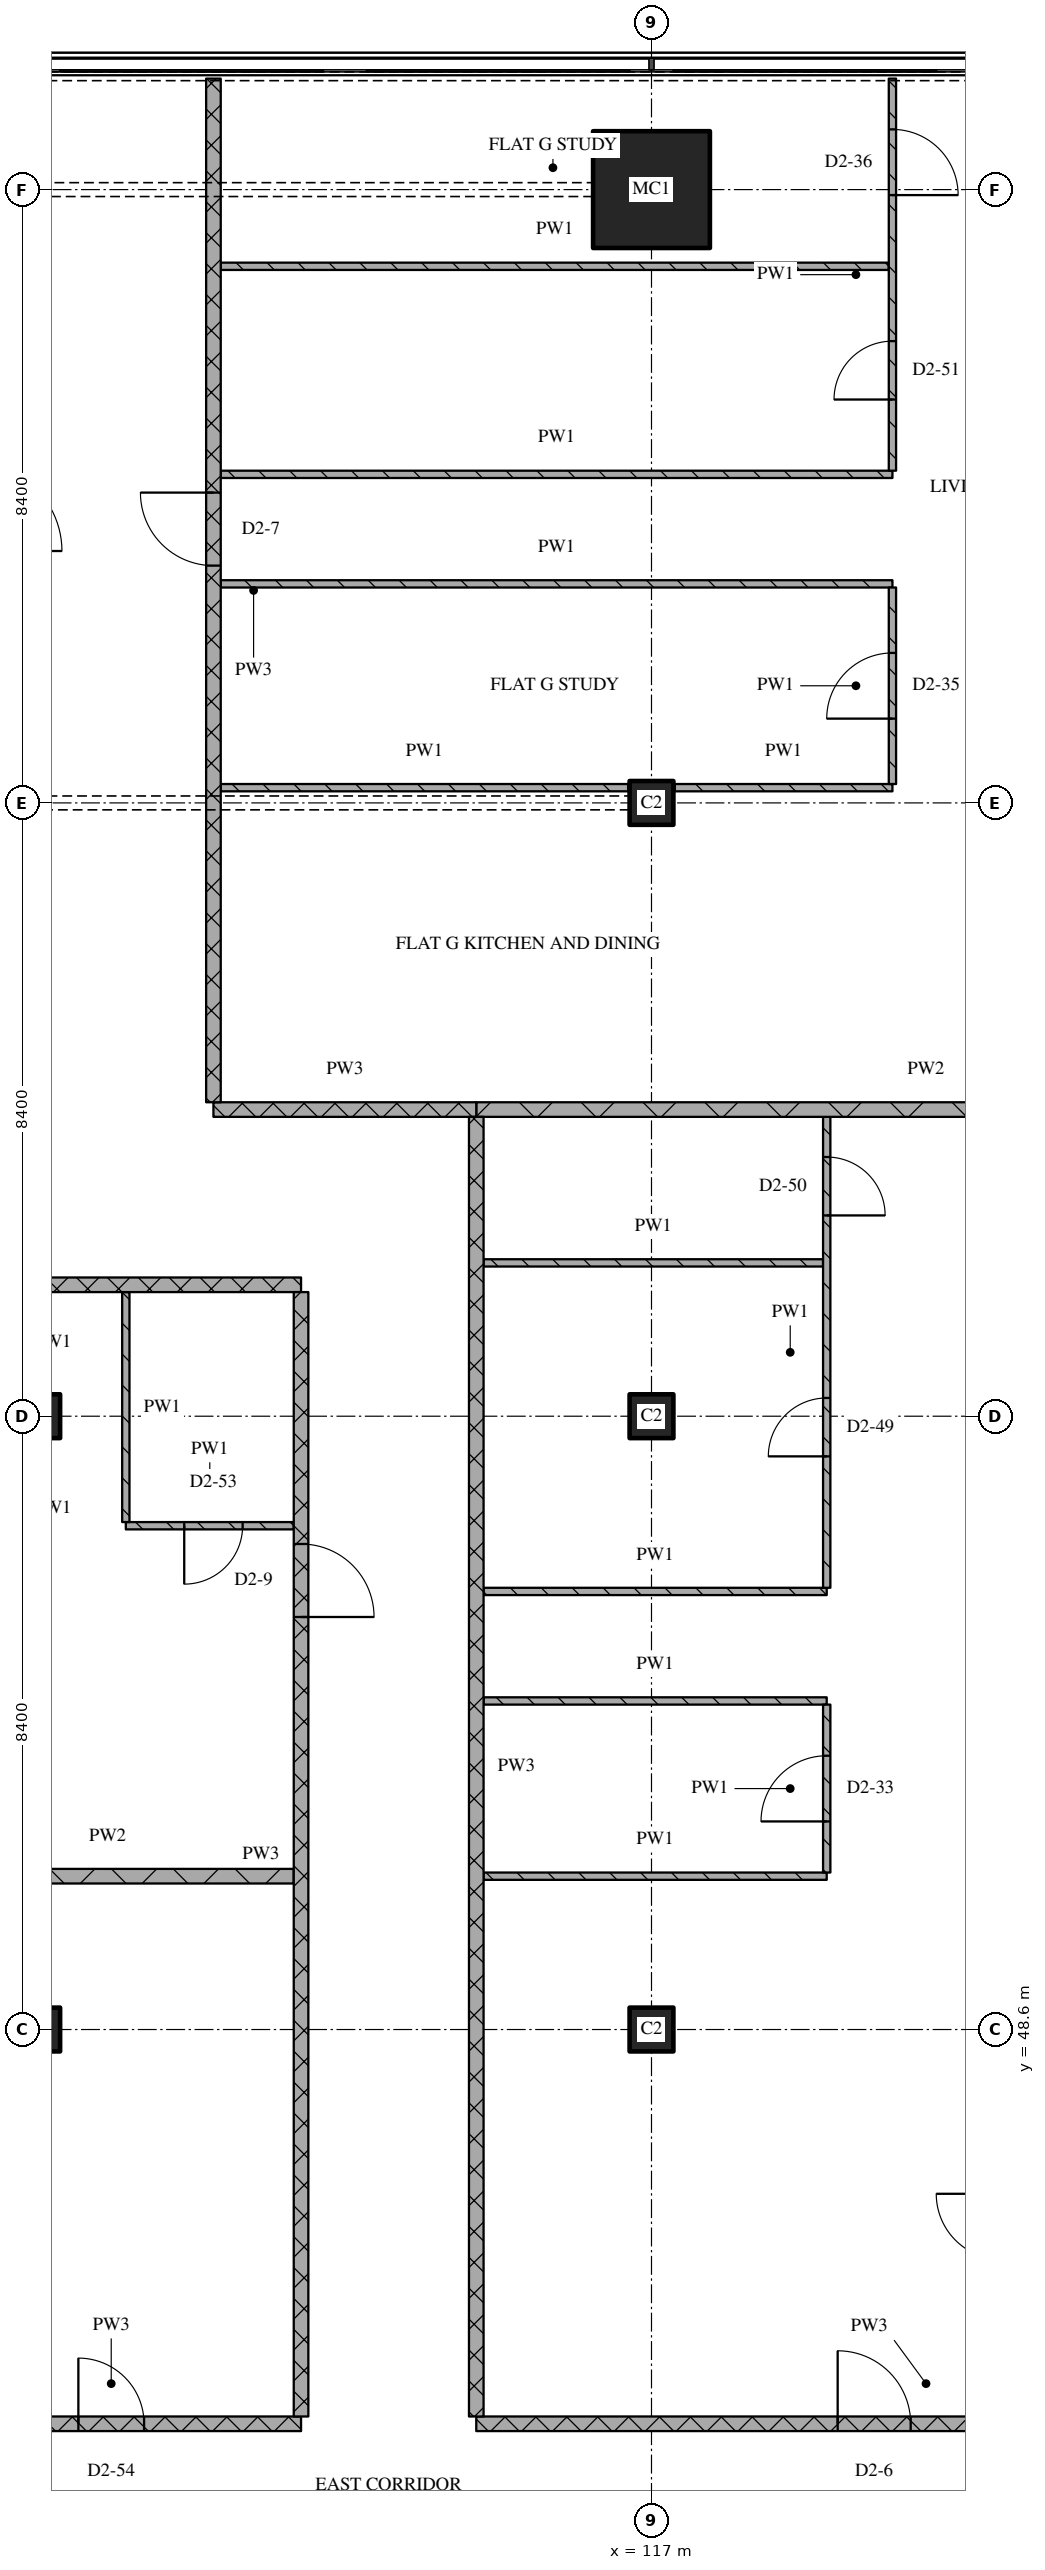
"""IFC4 building model, lengths in metres.
Left out: names, types, materials, properties, quantities, classifications, styles, units other than length and angle.
Written with IfcOpenShell. Run it as: python <this file> out.ifc"""

import sys

from ifc_helpers import new_model, si_unit, direction, frame, frame_2d, origin, origin_2d, place, context, subcontext, project, spatial, rectangle, extrude, element, fill, save


model = new_model("IFC4")
c1 = context("Model", 3, precision=1e-05, world=origin(), true_north=direction((0.0, 1.0)))
c2 = subcontext(c1, "Body", "Model", "MODEL_VIEW")
j1 = project(units=[si_unit("LENGTHUNIT", "METRE"), si_unit("PLANEANGLEUNIT", "RADIAN")], contexts=[c1])
p1 = place(None, origin())
s1 = spatial("IfcSite", under=j1, at=p1, CompositionType="ELEMENT")
p2 = place(p1, origin())
s2 = spatial("IfcBuilding", under=s1, at=p2, CompositionType="ELEMENT")
p3 = place(p2, frame((0.0, 0.0, 223.5)))
s3 = spatial("IfcBuildingStorey", under=s2, at=p3, CompositionType="ELEMENT", Elevation=223.5)
for number, where, z_axis, x_axis in (
    (1, (108.6, 48.6, 0.0), (0.0, 0.0, 1.0), (1.0, 0.0, 0.0)),
    (2, (108.6, 57.0, 0.0), (0.0, 0.0, 1.0), (1.0, 0.0, 0.0)),
    (3, (117.0, 48.6, 0.0), (0.0, 0.0, 1.0), (1.0, 0.0, 0.0)),
    (4, (117.0, 57.0, 0.0), (0.0, 0.0, 1.0), (1.0, 0.0, 0.0)),
    (5, (117.0, 65.4, 0.0), (0.0, 0.0, 1.0), (1.0, 0.0, 0.0)),
):
    element("IfcColumn", number, at=place(p3, frame(where, z_axis=z_axis, x_axis=x_axis)), inside=s3, PredefinedType="COLUMN", context=c2, shape_type="SweptSolid", body=[
        extrude(rectangle(XDim=0.6, YDim=0.6, at=origin_2d()), origin(), (0.0, 0.0, 1.0), 3.6),
    ])
p4 = place(p3, frame((117.0, 73.8, 0.0), z_axis=(0.0, 0.0, 1.0), x_axis=(1.0, 0.0, 0.0)))
e6 = element("IfcColumn", 6, at=p4, inside=s3, PredefinedType="COLUMN", context=c2, shape_type="SweptSolid", body=[
    extrude(rectangle(XDim=1.6, YDim=1.6, at=origin_2d()), origin(), (0.0, 0.0, 1.0), 3.6),
])
p5 = place(p3, frame((107.0, 43.2, 0.0), z_axis=(0.0, 0.0, 1.0), x_axis=(1.0, 0.0, 0.0)))
e7 = element("IfcWall", 7, at=p5, inside=s3, PredefinedType="PARTITIONING", context=c2, shape_type="SweptSolid", body=[
    extrude(rectangle(XDim=5.2, YDim=0.2, at=frame_2d((2.6, 0.0))), origin(), (0.0, 0.0, 1.0), 3.32),
])
p6 = place(p5, frame((2.15, 0.0, 0.0)))
e8 = element("IfcOpeningElement", 8, at=p6, cuts=e7, PredefinedType="OPENING", context=c2, shape_type="SweptSolid", body=[
    extrude(rectangle(XDim=0.9, YDim=2.1, at=frame_2d((0.45, 1.05))), frame((0.0, 0.11, 0.0), z_axis=(0.0, -1.0, 0.0), x_axis=(1.0, 0.0, 0.0)), (0.0, 0.0, 1.0), 0.22),
])
p7 = place(p3, frame((114.6, 43.2, 0.0), z_axis=(0.0, 0.0, 1.0), x_axis=(1.0, 0.0, 0.0)))
e9 = element("IfcWall", 9, at=p7, inside=s3, PredefinedType="PARTITIONING", context=c2, shape_type="SweptSolid", body=[
    extrude(rectangle(XDim=12.32, YDim=0.2, at=frame_2d((6.16, 0.0))), origin(), (0.0, 0.0, 1.0), 3.32),
])
p8 = place(p7, frame((4.95, 0.0, 0.0)))
e10 = element("IfcOpeningElement", 10, at=p8, cuts=e9, PredefinedType="OPENING", context=c2, shape_type="SweptSolid", body=[
    extrude(rectangle(XDim=1.0, YDim=2.1, at=frame_2d((0.5, 1.05))), frame((0.0, 0.11, 0.0), z_axis=(0.0, -1.0, 0.0), x_axis=(1.0, 0.0, 0.0)), (0.0, 0.0, 1.0), 0.22),
])
p9 = place(p3, frame((107.0, 50.7, 0.0), z_axis=(0.0, 0.0, 1.0), x_axis=(1.0, 0.0, 0.0)))
e11 = element("IfcWall", 11, at=p9, inside=s3, PredefinedType="PARTITIONING", context=c2, shape_type="SweptSolid", body=[
    extrude(rectangle(XDim=5.1, YDim=0.2, at=frame_2d((2.55, 0.0))), origin(), (0.0, 0.0, 1.0), 3.32),
])
for number, where, z_axis, x_axis in (
    (12, (114.7, 50.7, 0.0), (0.0, 0.0, 1.0), (1.0, 0.0, 0.0)),
    (13, (114.7, 53.1, 0.0), (0.0, 0.0, 1.0), (1.0, 0.0, 0.0)),
    (14, (114.7, 54.6, 0.0), (0.0, 0.0, 1.0), (1.0, 0.0, 0.0)),
):
    element("IfcWall", number, at=place(p3, frame(where, z_axis=z_axis, x_axis=x_axis)), inside=s3, PredefinedType="PARTITIONING", context=c2, shape_type="SweptSolid", body=[
        extrude(rectangle(XDim=4.7, YDim=0.1, at=frame_2d((2.35, 0.0))), origin(), (0.0, 0.0, 1.0), 3.32),
    ])
p10 = place(p3, frame((109.8, 55.5, 0.0), z_axis=(0.0, 0.0, 1.0), x_axis=(1.0, 0.0, 0.0)))
e15 = element("IfcWall", 15, at=p10, inside=s3, PredefinedType="PARTITIONING", context=c2, shape_type="SweptSolid", body=[
    extrude(rectangle(XDim=2.3, YDim=0.1, at=frame_2d((1.15, 0.0))), origin(), (0.0, 0.0, 1.0), 3.32),
])
p11 = place(p10, frame((0.8, 0.0, 0.0)))
e16 = element("IfcOpeningElement", 16, at=p11, cuts=e15, PredefinedType="OPENING", context=c2, shape_type="SweptSolid", body=[
    extrude(rectangle(XDim=0.8, YDim=2.1, at=frame_2d((0.4, 1.05))), frame((0.0, 0.06, 0.0), z_axis=(0.0, -1.0, 0.0), x_axis=(1.0, 0.0, 0.0)), (0.0, 0.0, 1.0), 0.12),
])
p12 = place(p3, frame((101.4, 58.8, 0.0), z_axis=(0.0, 0.0, 1.0), x_axis=(1.0, 0.0, 0.0)))
e17 = element("IfcWall", 17, at=p12, inside=s3, PredefinedType="PARTITIONING", context=c2, shape_type="SweptSolid", body=[
    extrude(rectangle(XDim=10.8, YDim=0.2, at=frame_2d((5.4, 0.0))), origin(), (0.0, 0.0, 1.0), 3.32),
])
p13 = place(p3, frame((114.7, 59.1, 0.0), z_axis=(0.0, 0.0, 1.0), x_axis=(1.0, 0.0, 0.0)))
e18 = element("IfcWall", 18, at=p13, inside=s3, PredefinedType="PARTITIONING", context=c2, shape_type="SweptSolid", body=[
    extrude(rectangle(XDim=4.65, YDim=0.1, at=frame_2d((2.325, 0.0))), origin(), (0.0, 0.0, 1.0), 3.32),
])
p14 = place(p3, frame((111.0, 61.2, 0.0), z_axis=(0.0, 0.0, 1.0), x_axis=(1.0, 0.0, 0.0)))
e19 = element("IfcWall", 19, at=p14, inside=s3, PredefinedType="PARTITIONING", context=c2, shape_type="SweptSolid", body=[
    extrude(rectangle(XDim=3.6, YDim=0.2, at=frame_2d((1.8, 0.0))), origin(), (0.0, 0.0, 1.0), 3.32),
])
p15 = place(p3, frame((114.6, 61.2, 0.0), z_axis=(0.0, 0.0, 1.0), x_axis=(1.0, 0.0, 0.0)))
e20 = element("IfcWall", 20, at=p15, inside=s3, PredefinedType="PARTITIONING", context=c2, shape_type="SweptSolid", body=[
    extrude(rectangle(XDim=12.32, YDim=0.2, at=frame_2d((6.16, 0.0))), origin(), (0.0, 0.0, 1.0), 3.32),
])
p16 = place(p3, frame((111.1, 65.609, 0.0), z_axis=(0.0, 0.0, 1.0), x_axis=(1.0, 0.0, 0.0)))
e21 = element("IfcWall", 21, at=p16, inside=s3, PredefinedType="PARTITIONING", context=c2, shape_type="SweptSolid", body=[
    extrude(rectangle(XDim=5.58, YDim=0.1, at=frame_2d((2.79, 0.0))), origin(), (0.0, 0.0, 1.0), 3.32),
])
p17 = place(p3, frame((117.32, 65.609, 0.0), z_axis=(0.0, 0.0, 1.0), x_axis=(1.0, 0.0, 0.0)))
e22 = element("IfcWall", 22, at=p17, inside=s3, PredefinedType="PARTITIONING", context=c2, shape_type="SweptSolid", body=[
    extrude(rectangle(XDim=2.98, YDim=0.1, at=frame_2d((1.49, 0.0))), origin(), (0.0, 0.0, 1.0), 3.32),
])
for number, where, z_axis, x_axis in (
    (23, (111.1, 68.4, 0.0), (0.0, 0.0, 1.0), (1.0, 0.0, 0.0)),
    (24, (111.1, 69.9, 0.0), (0.0, 0.0, 1.0), (1.0, 0.0, 0.0)),
):
    element("IfcWall", number, at=place(p3, frame(where, z_axis=z_axis, x_axis=x_axis)), inside=s3, PredefinedType="PARTITIONING", context=c2, shape_type="SweptSolid", body=[
        extrude(rectangle(XDim=9.2, YDim=0.1, at=frame_2d((4.6, 0.0))), origin(), (0.0, 0.0, 1.0), 3.32),
    ])
p18 = place(p3, frame((111.1, 72.75, 0.0), z_axis=(0.0, 0.0, 1.0), x_axis=(1.0, 0.0, 0.0)))
e25 = element("IfcWall", 25, at=p18, inside=s3, PredefinedType="PARTITIONING", context=c2, shape_type="SweptSolid", body=[
    extrude(rectangle(XDim=9.15, YDim=0.1, at=frame_2d((4.575, 0.0))), origin(), (0.0, 0.0, 1.0), 3.32),
])
p19 = place(p3, frame((109.8, 58.7, 0.0), z_axis=(0.0, 0.0, 1.0), x_axis=(0.0, -1.0, 0.0)))
e26 = element("IfcWall", 26, at=p19, inside=s3, PredefinedType="PARTITIONING", context=c2, shape_type="SweptSolid", body=[
    extrude(rectangle(XDim=3.15, YDim=0.1, at=frame_2d((1.575, 0.0))), origin(), (0.0, 0.0, 1.0), 3.32),
])
p20 = place(p3, frame((111.0, 75.32, 0.0), z_axis=(0.0, 0.0, 1.0), x_axis=(0.0, -1.0, 0.0)))
e27 = element("IfcWall", 27, at=p20, inside=s3, PredefinedType="PARTITIONING", context=c2, shape_type="SweptSolid", body=[
    extrude(rectangle(XDim=14.02, YDim=0.2, at=frame_2d((7.01, 0.0))), origin(), (0.0, 0.0, 1.0), 3.32),
])
p21 = place(p20, frame((5.67, 0.0, 0.0)))
e28 = element("IfcOpeningElement", 28, at=p21, cuts=e27, PredefinedType="OPENING", context=c2, shape_type="SweptSolid", body=[
    extrude(rectangle(XDim=1.0, YDim=2.1, at=frame_2d((0.5, 1.05))), frame((0.0, 0.11, 0.0), z_axis=(0.0, -1.0, 0.0), x_axis=(1.0, 0.0, 0.0)), (0.0, 0.0, 1.0), 0.22),
])
p22 = place(p3, frame((112.2, 43.3, 0.0), z_axis=(0.0, 0.0, 1.0), x_axis=(0.0, 1.0, 0.0)))
e29 = element("IfcWall", 29, at=p22, inside=s3, PredefinedType="PARTITIONING", context=c2, shape_type="SweptSolid", body=[
    extrude(rectangle(XDim=15.4, YDim=0.2, at=frame_2d((7.7, 0.0))), origin(), (0.0, 0.0, 1.0), 3.32),
])
p23 = place(p22, frame((10.95, 0.0, 0.0)))
e30 = element("IfcOpeningElement", 30, at=p23, cuts=e29, PredefinedType="OPENING", context=c2, shape_type="SweptSolid", body=[
    extrude(rectangle(XDim=1.0, YDim=2.1, at=frame_2d((0.5, 1.05))), frame((0.0, 0.11, 0.0), z_axis=(0.0, -1.0, 0.0), x_axis=(1.0, 0.0, 0.0)), (0.0, 0.0, 1.0), 0.22),
])
p24 = place(p3, frame((114.6, 61.1, 0.0), z_axis=(0.0, 0.0, 1.0), x_axis=(0.0, -1.0, 0.0)))
e31 = element("IfcWall", 31, at=p24, inside=s3, PredefinedType="PARTITIONING", context=c2, shape_type="SweptSolid", body=[
    extrude(rectangle(XDim=17.8, YDim=0.2, at=frame_2d((8.9, 0.0))), origin(), (0.0, 0.0, 1.0), 3.32),
])
p25 = place(p3, frame((119.4, 50.75, 0.0), z_axis=(0.0, 0.0, 1.0), x_axis=(0.0, 1.0, 0.0)))
e32 = element("IfcWall", 32, at=p25, inside=s3, PredefinedType="PARTITIONING", context=c2, shape_type="SweptSolid", body=[
    extrude(rectangle(XDim=2.3, YDim=0.1, at=frame_2d((1.15, 0.0))), origin(), (0.0, 0.0, 1.0), 3.32),
])
p26 = place(p25, frame((0.7, 0.0, 0.0)))
e33 = element("IfcOpeningElement", 33, at=p26, cuts=e32, PredefinedType="OPENING", context=c2, shape_type="SweptSolid", body=[
    extrude(rectangle(XDim=0.9, YDim=2.1, at=frame_2d((0.45, 1.05))), frame((0.0, 0.06, 0.0), z_axis=(0.0, -1.0, 0.0), x_axis=(1.0, 0.0, 0.0)), (0.0, 0.0, 1.0), 0.12),
])
p27 = place(p3, frame((119.4, 54.65, 0.0), z_axis=(0.0, 0.0, 1.0), x_axis=(0.0, 1.0, 0.0)))
e34 = element("IfcWall", 34, at=p27, inside=s3, PredefinedType="PARTITIONING", context=c2, shape_type="SweptSolid", body=[
    extrude(rectangle(XDim=6.45, YDim=0.1, at=frame_2d((3.225, 0.0))), origin(), (0.0, 0.0, 1.0), 3.32),
])
p28 = place(p27, frame((1.8, 0.0, 0.0)))
e35 = element("IfcOpeningElement", 35, at=p28, cuts=e34, PredefinedType="OPENING", context=c2, shape_type="SweptSolid", body=[
    extrude(rectangle(XDim=0.8, YDim=2.1, at=frame_2d((0.4, 1.05))), frame((0.0, 0.06, 0.0), z_axis=(0.0, -1.0, 0.0), x_axis=(1.0, 0.0, 0.0)), (0.0, 0.0, 1.0), 0.12),
])
p29 = place(p27, frame((5.1, 0.0, 0.0)))
e36 = element("IfcOpeningElement", 36, at=p29, cuts=e34, PredefinedType="OPENING", context=c2, shape_type="SweptSolid", body=[
    extrude(rectangle(XDim=0.8, YDim=2.1, at=frame_2d((0.4, 1.05))), frame((0.0, 0.06, 0.0), z_axis=(0.0, -1.0, 0.0), x_axis=(1.0, 0.0, 0.0)), (0.0, 0.0, 1.0), 0.12),
])
p30 = place(p3, frame((120.3, 65.659, 0.0), z_axis=(0.0, 0.0, 1.0), x_axis=(0.0, 1.0, 0.0)))
e37 = element("IfcWall", 37, at=p30, inside=s3, PredefinedType="PARTITIONING", context=c2, shape_type="SweptSolid", body=[
    extrude(rectangle(XDim=2.691, YDim=0.1, at=frame_2d((1.346, 0.0))), origin(), (0.0, 0.0, 1.0), 3.32),
])
p31 = place(p30, frame((0.896, 0.0, 0.0)))
e38 = element("IfcOpeningElement", 38, at=p31, cuts=e37, PredefinedType="OPENING", context=c2, shape_type="SweptSolid", body=[
    extrude(rectangle(XDim=0.9, YDim=2.1, at=frame_2d((0.45, 1.05))), frame((0.0, 0.06, 0.0), z_axis=(0.0, -1.0, 0.0), x_axis=(1.0, 0.0, 0.0)), (0.0, 0.0, 1.0), 0.12),
])
p32 = place(p3, frame((120.3, 69.95, 0.0), z_axis=(0.0, 0.0, 1.0), x_axis=(0.0, 1.0, 0.0)))
e39 = element("IfcWall", 39, at=p32, inside=s3, PredefinedType="PARTITIONING", context=c2, shape_type="SweptSolid", body=[
    extrude(rectangle(XDim=5.37, YDim=0.1, at=frame_2d((2.685, 0.0))), origin(), (0.0, 0.0, 1.0), 3.32),
])
p33 = place(p32, frame((0.975, 0.0, 0.0)))
e40 = element("IfcOpeningElement", 40, at=p33, cuts=e39, PredefinedType="OPENING", context=c2, shape_type="SweptSolid", body=[
    extrude(rectangle(XDim=0.8, YDim=2.1, at=frame_2d((0.4, 1.05))), frame((0.0, 0.06, 0.0), z_axis=(0.0, -1.0, 0.0), x_axis=(1.0, 0.0, 0.0)), (0.0, 0.0, 1.0), 0.12),
])
p34 = place(p32, frame((3.775, 0.0, 0.0)))
e41 = element("IfcOpeningElement", 41, at=p34, cuts=e39, PredefinedType="OPENING", context=c2, shape_type="SweptSolid", body=[
    extrude(rectangle(XDim=0.9, YDim=2.1, at=frame_2d((0.45, 1.05))), frame((0.0, 0.06, 0.0), z_axis=(0.0, -1.0, 0.0), x_axis=(1.0, 0.0, 0.0)), (0.0, 0.0, 1.0), 0.12),
])
p35 = place(p6, origin())
e42 = element("IfcDoor", 42, at=p35, inside=s3, OperationType="SINGLE_SWING_LEFT", PredefinedType="DOOR", context=c2, shape_type="SweptSolid", body=[
    extrude(rectangle(XDim=0.9, YDim=2.1, at=frame_2d((0.45, 1.05))), frame((0.0, 0.025, 0.0), z_axis=(0.0, -1.0, 0.0), x_axis=(1.0, 0.0, 0.0)), (0.0, 0.0, 1.0), 0.05),
])
fill(e8, e42)
p36 = place(p8, origin())
e43 = element("IfcDoor", 43, at=p36, inside=s3, OperationType="SINGLE_SWING_LEFT", PredefinedType="DOOR", context=c2, shape_type="SweptSolid", body=[
    extrude(rectangle(XDim=1.0, YDim=2.1, at=frame_2d((0.5, 1.05))), frame((0.0, 0.025, 0.0), z_axis=(0.0, -1.0, 0.0), x_axis=(1.0, 0.0, 0.0)), (0.0, 0.0, 1.0), 0.05),
])
fill(e10, e43)
p37 = place(p11, origin())
e44 = element("IfcDoor", 44, at=p37, inside=s3, OperationType="SINGLE_SWING_RIGHT", PredefinedType="DOOR", context=c2, shape_type="SweptSolid", body=[
    extrude(rectangle(XDim=0.8, YDim=2.1, at=frame_2d((0.4, 1.05))), frame((0.0, 0.025, 0.0), z_axis=(0.0, -1.0, 0.0), x_axis=(1.0, 0.0, 0.0)), (0.0, 0.0, 1.0), 0.05),
])
fill(e16, e44)
p38 = place(p21, origin())
e45 = element("IfcDoor", 45, at=p38, inside=s3, OperationType="SINGLE_SWING_RIGHT", PredefinedType="DOOR", context=c2, shape_type="SweptSolid", body=[
    extrude(rectangle(XDim=1.0, YDim=2.1, at=frame_2d((0.5, 1.05))), frame((0.0, 0.025, 0.0), z_axis=(0.0, -1.0, 0.0), x_axis=(1.0, 0.0, 0.0)), (0.0, 0.0, 1.0), 0.05),
])
fill(e28, e45)
p39 = place(p23, origin())
e46 = element("IfcDoor", 46, at=p39, inside=s3, OperationType="SINGLE_SWING_RIGHT", PredefinedType="DOOR", context=c2, shape_type="SweptSolid", body=[
    extrude(rectangle(XDim=1.0, YDim=2.1, at=frame_2d((0.5, 1.05))), frame((0.0, 0.025, 0.0), z_axis=(0.0, -1.0, 0.0), x_axis=(1.0, 0.0, 0.0)), (0.0, 0.0, 1.0), 0.05),
])
fill(e30, e46)
p40 = place(p26, origin())
e47 = element("IfcDoor", 47, at=p40, inside=s3, OperationType="SINGLE_SWING_LEFT", PredefinedType="DOOR", context=c2, shape_type="SweptSolid", body=[
    extrude(rectangle(XDim=0.9, YDim=2.1, at=frame_2d((0.45, 1.05))), frame((0.0, 0.025, 0.0), z_axis=(0.0, -1.0, 0.0), x_axis=(1.0, 0.0, 0.0)), (0.0, 0.0, 1.0), 0.05),
])
fill(e33, e47)
p41 = place(p28, origin())
e48 = element("IfcDoor", 48, at=p41, inside=s3, OperationType="SINGLE_SWING_LEFT", PredefinedType="DOOR", context=c2, shape_type="SweptSolid", body=[
    extrude(rectangle(XDim=0.8, YDim=2.1, at=frame_2d((0.4, 1.05))), frame((0.0, 0.025, 0.0), z_axis=(0.0, -1.0, 0.0), x_axis=(1.0, 0.0, 0.0)), (0.0, 0.0, 1.0), 0.05),
])
fill(e35, e48)
p42 = place(p29, origin())
e49 = element("IfcDoor", 49, at=p42, inside=s3, OperationType="SINGLE_SWING_RIGHT", PredefinedType="DOOR", context=c2, shape_type="SweptSolid", body=[
    extrude(rectangle(XDim=0.8, YDim=2.1, at=frame_2d((0.4, 1.05))), frame((0.0, 0.025, 0.0), z_axis=(0.0, -1.0, 0.0), x_axis=(1.0, 0.0, 0.0)), (0.0, 0.0, 1.0), 0.05),
])
fill(e36, e49)
p43 = place(p31, origin())
e50 = element("IfcDoor", 50, at=p43, inside=s3, OperationType="SINGLE_SWING_LEFT", PredefinedType="DOOR", context=c2, shape_type="SweptSolid", body=[
    extrude(rectangle(XDim=0.9, YDim=2.1, at=frame_2d((0.45, 1.05))), frame((0.0, 0.025, 0.0), z_axis=(0.0, -1.0, 0.0), x_axis=(1.0, 0.0, 0.0)), (0.0, 0.0, 1.0), 0.05),
])
fill(e38, e50)
p44 = place(p33, origin())
e51 = element("IfcDoor", 51, at=p44, inside=s3, OperationType="SINGLE_SWING_LEFT", PredefinedType="DOOR", context=c2, shape_type="SweptSolid", body=[
    extrude(rectangle(XDim=0.8, YDim=2.1, at=frame_2d((0.4, 1.05))), frame((0.0, 0.025, 0.0), z_axis=(0.0, -1.0, 0.0), x_axis=(1.0, 0.0, 0.0)), (0.0, 0.0, 1.0), 0.05),
])
fill(e40, e51)
p45 = place(p34, origin())
e52 = element("IfcDoor", 52, at=p45, inside=s3, OperationType="SINGLE_SWING_RIGHT", PredefinedType="DOOR", context=c2, shape_type="SweptSolid", body=[
    extrude(rectangle(XDim=0.9, YDim=2.1, at=frame_2d((0.45, 1.05))), frame((0.0, 0.025, 0.0), z_axis=(0.0, -1.0, 0.0), x_axis=(1.0, 0.0, 0.0)), (0.0, 0.0, 1.0), 0.05),
])
fill(e41, e52)
save(model, sys.argv[1])
